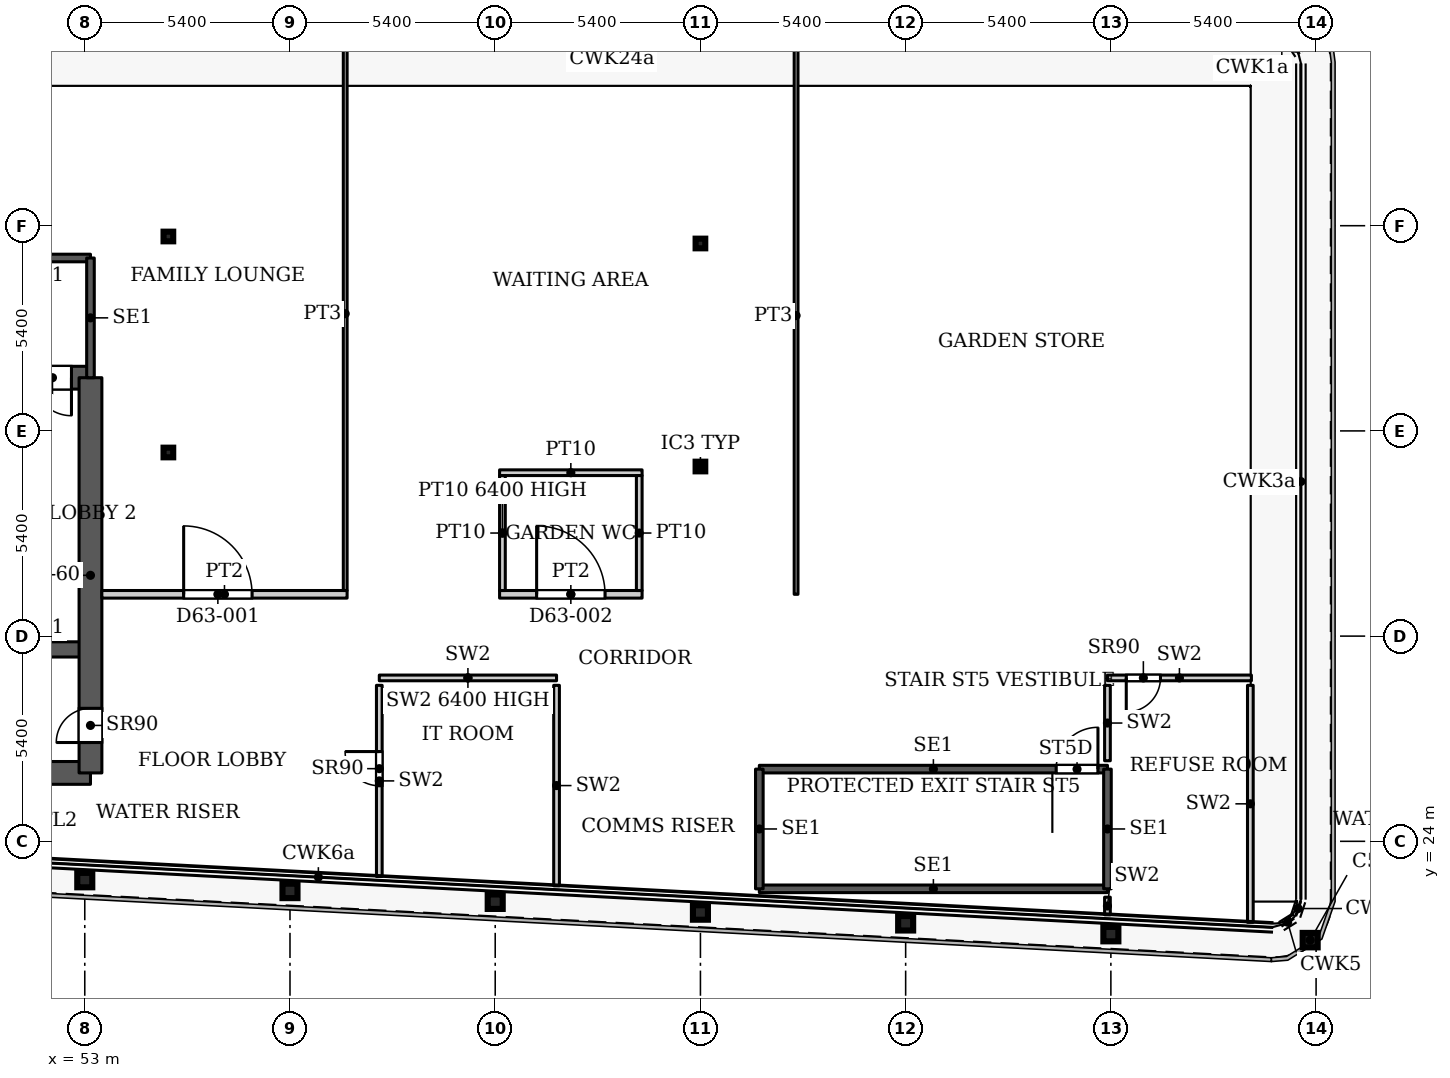
"""IFC4 building model, lengths in metres.
Left out: names, types, materials, properties, quantities, classifications, styles, units other than length and angle.
Written with IfcOpenShell. Run it as: python <this file> out.ifc"""

import sys

from ifc_helpers import new_model, si_unit, direction, frame, frame_2d, origin, origin_2d, place, context, subcontext, project, spatial, rectangle, hollow_rectangle, i_section, extrude, source, transform, mapped, element, fill, save


model = new_model("IFC4")
c1 = context("Model", 3, precision=1e-05, world=origin(), true_north=direction((0.0, 1.0)))
c2 = subcontext(c1, "Body", "Model", "MODEL_VIEW")
j1 = project(units=[si_unit("LENGTHUNIT", "METRE"), si_unit("PLANEANGLEUNIT", "RADIAN")], contexts=[c1])
p1 = place(None, origin())
s1 = spatial("IfcSite", under=j1, at=p1, CompositionType="ELEMENT")
p2 = place(p1, origin())
s2 = spatial("IfcBuilding", under=s1, at=p2, CompositionType="ELEMENT")
p3 = place(p2, frame((0.0, 0.0, 266.9)))
s3 = spatial("IfcBuildingStorey", under=s2, at=p3, CompositionType="ELEMENT", Elevation=266.9)
for number, where, z_axis, x_axis in (
    (1, (85.244, 21.4, 0.0), (0.0, 0.0, 1.0), (1.0, 0.0, 0.0)),
    (2, (80.0, 21.558, 0.0), (0.0, 0.0, 1.0), (1.0, 0.0, 0.0)),
    (3, (74.6, 21.843, 0.0), (0.0, 0.0, 1.0), (1.0, 0.0, 0.0)),
    (4, (69.2, 22.127, 0.0), (0.0, 0.0, 1.0), (1.0, 0.0, 0.0)),
    (5, (63.8, 22.411, 0.0), (0.0, 0.0, 1.0), (1.0, 0.0, 0.0)),
    (6, (58.4, 22.695, 0.0), (0.0, 0.0, 1.0), (1.0, 0.0, 0.0)),
    (7, (53.0, 22.98, 0.0), (0.0, 0.0, 1.0), (1.0, 0.0, 0.0)),
):
    element("IfcColumn", number, at=place(p3, frame(where, z_axis=z_axis, x_axis=x_axis)), inside=s3, PredefinedType="COLUMN", context=c2, shape_type="SweptSolid", body=[
        extrude(i_section(OverallWidth=0.395, OverallDepth=0.38, WebThickness=0.019, FlangeThickness=0.03, FilletRadius=0.011, at=origin_2d()), origin(), (0.0, 0.0, 1.0), 7.8),
    ])
for number, where, z_axis, x_axis in (
    (8, (69.2, 33.863, 0.0), (0.0, 0.0, 1.0), (1.0, 0.0, 0.0)),
    (9, (55.2, 34.232, 0.0), (0.0, 0.0, 1.0), (1.0, 0.0, 0.0)),
    (10, (69.2, 39.732, 0.0), (0.0, 0.0, 1.0), (1.0, 0.0, 0.0)),
    (11, (55.2, 39.916, 0.0), (0.0, 0.0, 1.0), (1.0, 0.0, 0.0)),
):
    element("IfcColumn", number, at=place(p3, frame(where, z_axis=z_axis, x_axis=x_axis)), inside=s3, PredefinedType="COLUMN", context=c2, shape_type="SweptSolid", body=[
        extrude(hollow_rectangle(XDim=0.254, YDim=0.254, WallThickness=0.013, InnerFilletRadius=0.013, OuterFilletRadius=0.025, at=origin_2d()), origin(), (0.0, 0.0, 1.0), 7.8),
    ])
p4 = place(p3, frame((34.75, 25.8, 0.0), z_axis=(0.0, 0.0, 1.0), x_axis=(1.0, 0.0, 0.0)))
e12 = element("IfcWall", 12, at=p4, inside=s3, PredefinedType="SHEAR", context=c2, shape_type="SweptSolid", body=[
    extrude(rectangle(XDim=18.4, YDim=0.6, at=frame_2d((9.2, 0.0))), origin(), (0.0, 0.0, 1.0), 7.8),
])
p5 = place(p3, frame((34.75, 29.05, 0.0), z_axis=(0.0, 0.0, 1.0), x_axis=(1.0, 0.0, 0.0)))
e13 = element("IfcWall", 13, at=p5, inside=s3, PredefinedType="SHEAR", context=c2, shape_type="SweptSolid", body=[
    extrude(rectangle(XDim=18.4, YDim=0.4, at=frame_2d((9.2, 0.0))), origin(), (0.0, 0.0, 1.0), 7.8),
])
p6 = place(p5, frame((0.875, 0.0, 0.0)))
e14 = element("IfcOpeningElement", 14, at=p6, cuts=e13, PredefinedType="OPENING", context=c2, shape_type="SweptSolid", body=[
    extrude(rectangle(XDim=1.1, YDim=2.2, at=frame_2d((0.55, 1.1))), frame((0.0, 0.21, 0.0), z_axis=(0.0, -1.0, 0.0), x_axis=(1.0, 0.0, 0.0)), (0.0, 0.0, 1.0), 0.42),
])
p7 = place(p5, frame((3.725, 0.0, 0.0)))
e15 = element("IfcOpeningElement", 15, at=p7, cuts=e13, PredefinedType="OPENING", context=c2, shape_type="SweptSolid", body=[
    extrude(rectangle(XDim=1.1, YDim=2.2, at=frame_2d((0.55, 1.1))), frame((0.0, 0.21, 0.0), z_axis=(0.0, -1.0, 0.0), x_axis=(1.0, 0.0, 0.0)), (0.0, 0.0, 1.0), 0.42),
])
p8 = place(p5, frame((6.575, 0.0, 0.0)))
e16 = element("IfcOpeningElement", 16, at=p8, cuts=e13, PredefinedType="OPENING", context=c2, shape_type="SweptSolid", body=[
    extrude(rectangle(XDim=1.1, YDim=2.2, at=frame_2d((0.55, 1.1))), frame((0.0, 0.21, 0.0), z_axis=(0.0, -1.0, 0.0), x_axis=(1.0, 0.0, 0.0)), (0.0, 0.0, 1.0), 0.42),
])
p9 = place(p5, frame((9.425, 0.0, 0.0)))
e17 = element("IfcOpeningElement", 17, at=p9, cuts=e13, PredefinedType="OPENING", context=c2, shape_type="SweptSolid", body=[
    extrude(rectangle(XDim=1.1, YDim=2.2, at=frame_2d((0.55, 1.1))), frame((0.0, 0.21, 0.0), z_axis=(0.0, -1.0, 0.0), x_axis=(1.0, 0.0, 0.0)), (0.0, 0.0, 1.0), 0.42),
])
p10 = place(p5, frame((12.275, 0.0, 0.0)))
e18 = element("IfcOpeningElement", 18, at=p10, cuts=e13, PredefinedType="OPENING", context=c2, shape_type="SweptSolid", body=[
    extrude(rectangle(XDim=1.1, YDim=2.2, at=frame_2d((0.55, 1.1))), frame((0.0, 0.21, 0.0), z_axis=(0.0, -1.0, 0.0), x_axis=(1.0, 0.0, 0.0)), (0.0, 0.0, 1.0), 0.42),
])
p11 = place(p5, frame((15.125, 0.0, 0.0)))
e19 = element("IfcOpeningElement", 19, at=p11, cuts=e13, PredefinedType="OPENING", context=c2, shape_type="SweptSolid", body=[
    extrude(rectangle(XDim=1.1, YDim=2.2, at=frame_2d((0.55, 1.1))), frame((0.0, 0.21, 0.0), z_axis=(0.0, -1.0, 0.0), x_axis=(1.0, 0.0, 0.0)), (0.0, 0.0, 1.0), 0.42),
])
p12 = place(p3, frame((34.75, 36.2, 0.0), z_axis=(0.0, 0.0, 1.0), x_axis=(1.0, 0.0, 0.0)))
e20 = element("IfcWall", 20, at=p12, inside=s3, PredefinedType="SHEAR", context=c2, shape_type="SweptSolid", body=[
    extrude(rectangle(XDim=18.4, YDim=0.6, at=frame_2d((9.2, 0.0))), origin(), (0.0, 0.0, 1.0), 7.8),
])
p13 = place(p12, frame((16.9, 0.0, 0.0)))
e21 = element("IfcOpeningElement", 21, at=p13, cuts=e20, PredefinedType="OPENING", context=c2, shape_type="SweptSolid", body=[
    extrude(rectangle(XDim=1.0, YDim=2.2, at=frame_2d((0.5, 1.1))), frame((0.0, 0.31, 0.0), z_axis=(0.0, -1.0, 0.0), x_axis=(1.0, 0.0, 0.0)), (0.0, 0.0, 1.0), 0.62),
])
p14 = place(p3, frame((53.15, 25.8, 0.0), z_axis=(0.0, 0.0, 1.0), x_axis=(0.0, 1.0, 0.0)))
e22 = element("IfcWall", 22, at=p14, inside=s3, PredefinedType="SHEAR", context=c2, shape_type="SweptSolid", body=[
    extrude(rectangle(XDim=10.4, YDim=0.6, at=frame_2d((5.2, 0.0))), origin(), (0.0, 0.0, 1.0), 7.8),
])
p15 = place(p14, frame((0.8, 0.0, 0.0)))
e23 = element("IfcOpeningElement", 23, at=p15, cuts=e22, PredefinedType="OPENING", context=c2, shape_type="SweptSolid", body=[
    extrude(rectangle(XDim=0.9, YDim=2.2, at=frame_2d((0.45, 1.1))), frame((0.0, 0.31, 0.0), z_axis=(0.0, -1.0, 0.0), x_axis=(1.0, 0.0, 0.0)), (0.0, 0.0, 1.0), 0.62),
])
p16 = place(p3, frame((43.99, 39.35, 0.0), z_axis=(0.0, 0.0, 1.0), x_axis=(1.0, 0.0, 0.0)))
e24 = element("IfcWall", 24, at=p16, inside=s3, PredefinedType="SHEAR", context=c2, shape_type="SweptSolid", body=[
    extrude(rectangle(XDim=9.16, YDim=0.2, at=frame_2d((4.58, 0.0))), origin(), (0.0, 0.0, 1.0), 7.8),
])
p17 = place(p3, frame((53.15, 36.2, 0.0), z_axis=(0.0, 0.0, 1.0), x_axis=(0.0, 1.0, 0.0)))
e25 = element("IfcWall", 25, at=p17, inside=s3, PredefinedType="SHEAR", context=c2, shape_type="SweptSolid", body=[
    extrude(rectangle(XDim=3.15, YDim=0.2, at=frame_2d((1.575, 0.0))), origin(), (0.0, 0.0, 1.0), 7.8),
])
p18 = place(p3, frame((70.75, 22.75, 0.0), z_axis=(0.0, 0.0, 1.0), x_axis=(1.0, 0.0, 0.0)))
e26 = element("IfcWall", 26, at=p18, inside=s3, PredefinedType="SHEAR", context=c2, shape_type="SweptSolid", body=[
    extrude(rectangle(XDim=9.16, YDim=0.2, at=frame_2d((4.58, 0.0))), origin(), (0.0, 0.0, 1.0), 7.8),
])
p19 = place(p3, frame((70.75, 25.9, 0.0), z_axis=(0.0, 0.0, 1.0), x_axis=(1.0, 0.0, 0.0)))
e27 = element("IfcWall", 27, at=p19, inside=s3, PredefinedType="SHEAR", context=c2, shape_type="SweptSolid", body=[
    extrude(rectangle(XDim=9.16, YDim=0.2, at=frame_2d((4.58, 0.0))), origin(), (0.0, 0.0, 1.0), 7.8),
])
p20 = place(p19, frame((7.81, 0.0, 0.0)))
e28 = element("IfcOpeningElement", 28, at=p20, cuts=e27, PredefinedType="OPENING", context=c2, shape_type="SweptSolid", body=[
    extrude(rectangle(XDim=1.1, YDim=2.2, at=frame_2d((0.55, 1.1))), frame((0.0, 0.11, 0.0), z_axis=(0.0, -1.0, 0.0), x_axis=(1.0, 0.0, 0.0)), (0.0, 0.0, 1.0), 0.22),
])
for number, where, z_axis, x_axis in (
    (29, (70.75, 22.75, 0.0), (0.0, 0.0, 1.0), (0.0, 1.0, 0.0)),
    (30, (79.91, 22.75, 0.0), (0.0, 0.0, 1.0), (0.0, 1.0, 0.0)),
):
    element("IfcWall", number, at=place(p3, frame(where, z_axis=z_axis, x_axis=x_axis)), inside=s3, PredefinedType="SHEAR", context=c2, shape_type="SweptSolid", body=[
        extrude(rectangle(XDim=3.15, YDim=0.2, at=frame_2d((1.575, 0.0))), origin(), (0.0, 0.0, 1.0), 7.8),
    ])
p21 = place(p3, frame((60.75, 28.3, 0.0), z_axis=(0.0, 0.0, 1.0), x_axis=(1.0, 0.0, 0.0)))
e31 = element("IfcWall", 31, at=p21, inside=s3, PredefinedType="PARTITIONING", context=c2, shape_type="SweptSolid", body=[
    extrude(rectangle(XDim=4.664, YDim=0.15, at=frame_2d((2.332, 0.0))), origin(), (0.0, 0.0, 1.0), 6.4),
])
p22 = place(p3, frame((60.75, 23.075, 0.0), z_axis=(0.0, 0.0, 1.0), x_axis=(0.0, 1.0, 0.0)))
e32 = element("IfcWall", 32, at=p22, inside=s3, PredefinedType="PARTITIONING", context=c2, shape_type="SweptSolid", body=[
    extrude(rectangle(XDim=5.03, YDim=0.15, at=frame_2d((2.515, 0.0))), origin(), (0.0, 0.0, 1.0), 7.8),
])
p23 = place(p22, frame((2.387, 0.0, 0.0)))
e33 = element("IfcOpeningElement", 33, at=p23, cuts=e32, PredefinedType="OPENING", context=c2, shape_type="SweptSolid", body=[
    extrude(rectangle(XDim=0.9, YDim=2.2, at=frame_2d((0.45, 1.1))), frame((0.0, 0.085, 0.0), z_axis=(0.0, -1.0, 0.0), x_axis=(1.0, 0.0, 0.0)), (0.0, 0.0, 1.0), 0.17),
])
p24 = place(p3, frame((65.414, 22.829, 0.0), z_axis=(0.0, 0.0, 1.0), x_axis=(0.0, 1.0, 0.0)))
e34 = element("IfcWall", 34, at=p24, inside=s3, PredefinedType="PARTITIONING", context=c2, shape_type="SweptSolid", body=[
    extrude(rectangle(XDim=5.276, YDim=0.15, at=frame_2d((2.638, 0.0))), origin(), (0.0, 0.0, 1.0), 7.8),
])
p25 = place(p3, frame((79.91, 28.3, 0.0), z_axis=(0.0, 0.0, 1.0), x_axis=(1.0, 0.0, 0.0)))
e35 = element("IfcWall", 35, at=p25, inside=s3, PredefinedType="PARTITIONING", context=c2, shape_type="SweptSolid", body=[
    extrude(rectangle(XDim=3.788, YDim=0.15, at=frame_2d((1.894, 0.0))), origin(), (0.0, 0.0, 1.0), 7.8),
])
p26 = place(p25, frame((0.495, 0.0, 0.0)))
e36 = element("IfcOpeningElement", 36, at=p26, cuts=e35, PredefinedType="OPENING", context=c2, shape_type="SweptSolid", body=[
    extrude(rectangle(XDim=0.9, YDim=2.2, at=frame_2d((0.45, 1.1))), frame((0.0, 0.085, 0.0), z_axis=(0.0, -1.0, 0.0), x_axis=(1.0, 0.0, 0.0)), (0.0, 0.0, 1.0), 0.17),
])
p27 = place(p3, frame((79.91, 22.066, 0.0), z_axis=(0.0, 0.0, 1.0), x_axis=(0.0, 1.0, 0.0)))
e37 = element("IfcWall", 37, at=p27, inside=s3, PredefinedType="PARTITIONING", context=c2, shape_type="SweptSolid", body=[
    extrude(rectangle(XDim=0.464, YDim=0.15, at=frame_2d((0.232, 0.0))), origin(), (0.0, 0.0, 1.0), 7.8),
])
p28 = place(p3, frame((79.91, 26.12, 0.0), z_axis=(0.0, 0.0, 1.0), x_axis=(0.0, 1.0, 0.0)))
e38 = element("IfcWall", 38, at=p28, inside=s3, PredefinedType="PARTITIONING", context=c2, shape_type="SweptSolid", body=[
    extrude(rectangle(XDim=1.985, YDim=0.15, at=frame_2d((0.992, 0.0))), origin(), (0.0, 0.0, 1.0), 7.8),
])
p29 = place(p3, frame((83.67, 21.868, 0.0), z_axis=(0.0, 0.0, 1.0), x_axis=(0.0, 1.0, 0.0)))
e39 = element("IfcWall", 39, at=p29, inside=s3, PredefinedType="PARTITIONING", context=c2, shape_type="SweptSolid", body=[
    extrude(rectangle(XDim=6.237, YDim=0.15, at=frame_2d((3.119, 0.0))), origin(), (0.0, 0.0, 1.0), 7.8),
])
p30 = place(p3, frame((53.449, 30.5, 0.0), z_axis=(0.0, 0.0, 1.0), x_axis=(1.0, 0.0, 0.0)))
e40 = element("IfcWall", 40, at=p30, inside=s3, PredefinedType="PARTITIONING", context=c2, shape_type="SweptSolid", body=[
    extrude(rectangle(XDim=6.454, YDim=0.2, at=frame_2d((3.227, 0.0))), origin(), (0.0, 0.0, 1.0), 7.5),
])
p31 = place(p30, frame((2.153, 0.0, 0.0)))
e41 = element("IfcOpeningElement", 41, at=p31, cuts=e40, PredefinedType="OPENING", context=c2, shape_type="SweptSolid", body=[
    extrude(rectangle(XDim=1.8, YDim=2.1, at=frame_2d((0.9, 1.05))), frame((0.0, 0.11, 0.0), z_axis=(0.0, -1.0, 0.0), x_axis=(1.0, 0.0, 0.0)), (0.0, 0.0, 1.0), 0.22),
])
p32 = place(p3, frame((59.853, 30.6, 0.0), z_axis=(0.0, 0.0, 1.0), x_axis=(0.0, 1.0, 0.0)))
e42 = element("IfcWall", 42, at=p32, inside=s3, PredefinedType="PARTITIONING", context=c2, shape_type="SweptSolid", body=[
    extrude(rectangle(XDim=14.57, YDim=0.1, at=frame_2d((7.285, 0.0))), origin(), (0.0, 0.0, 1.0), 7.5),
])
p33 = place(p3, frame((63.915, 30.5, 0.0), z_axis=(0.0, 0.0, 1.0), x_axis=(1.0, 0.0, 0.0)))
e43 = element("IfcWall", 43, at=p33, inside=s3, PredefinedType="PARTITIONING", context=c2, shape_type="SweptSolid", body=[
    extrude(rectangle(XDim=3.75, YDim=0.2, at=frame_2d((1.875, 0.0))), origin(), (0.0, 0.0, 1.0), 7.5),
])
p34 = place(p33, frame((0.975, 0.0, 0.0)))
e44 = element("IfcOpeningElement", 44, at=p34, cuts=e43, PredefinedType="OPENING", context=c2, shape_type="SweptSolid", body=[
    extrude(rectangle(XDim=1.8, YDim=2.1, at=frame_2d((0.9, 1.05))), frame((0.0, 0.11, 0.0), z_axis=(0.0, -1.0, 0.0), x_axis=(1.0, 0.0, 0.0)), (0.0, 0.0, 1.0), 0.22),
])
p35 = place(p3, frame((63.915, 33.7, 0.0), z_axis=(0.0, 0.0, 1.0), x_axis=(1.0, 0.0, 0.0)))
e45 = element("IfcWall", 45, at=p35, inside=s3, PredefinedType="PARTITIONING", context=c2, shape_type="SweptSolid", body=[
    extrude(rectangle(XDim=3.75, YDim=0.15, at=frame_2d((1.875, 0.0))), origin(), (0.0, 0.0, 1.0), 7.5),
])
p36 = place(p3, frame((63.99, 30.6, 0.0), z_axis=(0.0, 0.0, 1.0), x_axis=(0.0, 1.0, 0.0)))
e46 = element("IfcWall", 46, at=p36, inside=s3, PredefinedType="PARTITIONING", context=c2, shape_type="SweptSolid", body=[
    extrude(rectangle(XDim=3.025, YDim=0.15, at=frame_2d((1.512, 0.0))), origin(), (0.0, 0.0, 1.0), 6.4),
])
p37 = place(p3, frame((67.59, 30.6, 0.0), z_axis=(0.0, 0.0, 1.0), x_axis=(0.0, 1.0, 0.0)))
e47 = element("IfcWall", 47, at=p37, inside=s3, PredefinedType="PARTITIONING", context=c2, shape_type="SweptSolid", body=[
    extrude(rectangle(XDim=3.025, YDim=0.15, at=frame_2d((1.512, 0.0))), origin(), (0.0, 0.0, 1.0), 7.5),
])
p38 = place(p3, frame((71.717, 30.5, 0.0), z_axis=(0.0, 0.0, 1.0), x_axis=(0.0, 1.0, 0.0)))
e48 = element("IfcWall", 48, at=p38, inside=s3, PredefinedType="PARTITIONING", context=c2, shape_type="SweptSolid", body=[
    extrude(rectangle(XDim=14.67, YDim=0.1, at=frame_2d((7.335, 0.0))), origin(), (0.0, 0.0, 1.0), 7.5),
])
m1 = source(origin(), c2, "Body", "SweptSolid", [
    extrude(rectangle(XDim=0.9, YDim=2.2, at=frame_2d((0.45, 1.1))), frame((0.0, 0.025, 0.0), z_axis=(0.0, -1.0, 0.0), x_axis=(1.0, 0.0, 0.0)), (0.0, 0.0, 1.0), 0.05),
])
p39 = place(p15, origin())
e49 = element("IfcDoor", 49, at=p39, inside=s3, OperationType="SINGLE_SWING_LEFT", PredefinedType="DOOR", context=c2, shape_type="MappedRepresentation", body=[
    mapped(m1, transform((0.0, 0.0, 0.0), x_axis=(1.0, 0.0, 0.0), y_axis=(0.0, 1.0, 0.0), z_axis=(0.0, 0.0, 1.0), scale=1.0)),
])
fill(e23, e49)
p40 = place(p23, origin())
e50 = element("IfcDoor", 50, at=p40, inside=s3, OperationType="SINGLE_SWING_LEFT", PredefinedType="DOOR", context=c2, shape_type="MappedRepresentation", body=[
    mapped(m1, transform((0.0, 0.0, 0.0), x_axis=(1.0, 0.0, 0.0), y_axis=(0.0, 1.0, 0.0), z_axis=(0.0, 0.0, 1.0), scale=1.0)),
])
fill(e33, e50)
p41 = place(p26, origin())
e51 = element("IfcDoor", 51, at=p41, inside=s3, OperationType="SINGLE_SWING_RIGHT", PredefinedType="DOOR", context=c2, shape_type="MappedRepresentation", body=[
    mapped(m1, transform((0.0, 0.0, 0.0), x_axis=(1.0, 0.0, 0.0), y_axis=(0.0, 1.0, 0.0), z_axis=(0.0, 0.0, 1.0), scale=1.0)),
])
fill(e36, e51)
m2 = source(origin(), c2, "Body", "SweptSolid", [
    extrude(rectangle(XDim=1.0, YDim=2.2, at=frame_2d((0.5, 1.1))), frame((0.0, 0.025, 0.0), z_axis=(0.0, -1.0, 0.0), x_axis=(1.0, 0.0, 0.0)), (0.0, 0.0, 1.0), 0.05),
])
p42 = place(p13, origin())
e52 = element("IfcDoor", 52, at=p42, inside=s3, OperationType="SINGLE_SWING_RIGHT", PredefinedType="DOOR", context=c2, shape_type="MappedRepresentation", body=[
    mapped(m2, transform((0.0, 0.0, 0.0), x_axis=(1.0, 0.0, 0.0), y_axis=(0.0, 1.0, 0.0), z_axis=(0.0, 0.0, 1.0), scale=1.0)),
])
fill(e21, e52)
m3 = source(origin(), c2, "Body", "SweptSolid", [
    extrude(rectangle(XDim=1.1, YDim=2.2, at=frame_2d((0.55, 1.1))), frame((0.0, 0.025, 0.0), z_axis=(0.0, -1.0, 0.0), x_axis=(1.0, 0.0, 0.0)), (0.0, 0.0, 1.0), 0.05),
])
p43 = place(p20, origin())
e53 = element("IfcDoor", 53, at=p43, inside=s3, OperationType="SINGLE_SWING_LEFT", PredefinedType="DOOR", context=c2, shape_type="MappedRepresentation", body=[
    mapped(m3, transform((0.0, 0.0, 0.0), x_axis=(1.0, 0.0, 0.0), y_axis=(0.0, 1.0, 0.0), z_axis=(0.0, 0.0, 1.0), scale=1.0)),
])
fill(e28, e53)
m4 = source(origin(), c2, "Body", "SweptSolid", [
    extrude(rectangle(XDim=1.8, YDim=2.1, at=frame_2d((0.9, 1.05))), frame((0.0, 0.025, 0.0), z_axis=(0.0, -1.0, 0.0), x_axis=(1.0, 0.0, 0.0)), (0.0, 0.0, 1.0), 0.05),
])
p44 = place(p31, origin())
e54 = element("IfcDoor", 54, at=p44, inside=s3, OperationType="DOUBLE_DOOR_SINGLE_SWING", PredefinedType="DOOR", context=c2, shape_type="MappedRepresentation", body=[
    mapped(m4, transform((0.0, 0.0, 0.0), x_axis=(1.0, 0.0, 0.0), y_axis=(0.0, 1.0, 0.0), z_axis=(0.0, 0.0, 1.0), scale=1.0)),
])
fill(e41, e54)
p45 = place(p34, origin())
e55 = element("IfcDoor", 55, at=p45, inside=s3, OperationType="DOUBLE_DOOR_SINGLE_SWING", PredefinedType="DOOR", context=c2, shape_type="MappedRepresentation", body=[
    mapped(m4, transform((0.0, 0.0, 0.0), x_axis=(1.0, 0.0, 0.0), y_axis=(0.0, 1.0, 0.0), z_axis=(0.0, 0.0, 1.0), scale=1.0)),
])
fill(e44, e55)
save(model, sys.argv[1])
